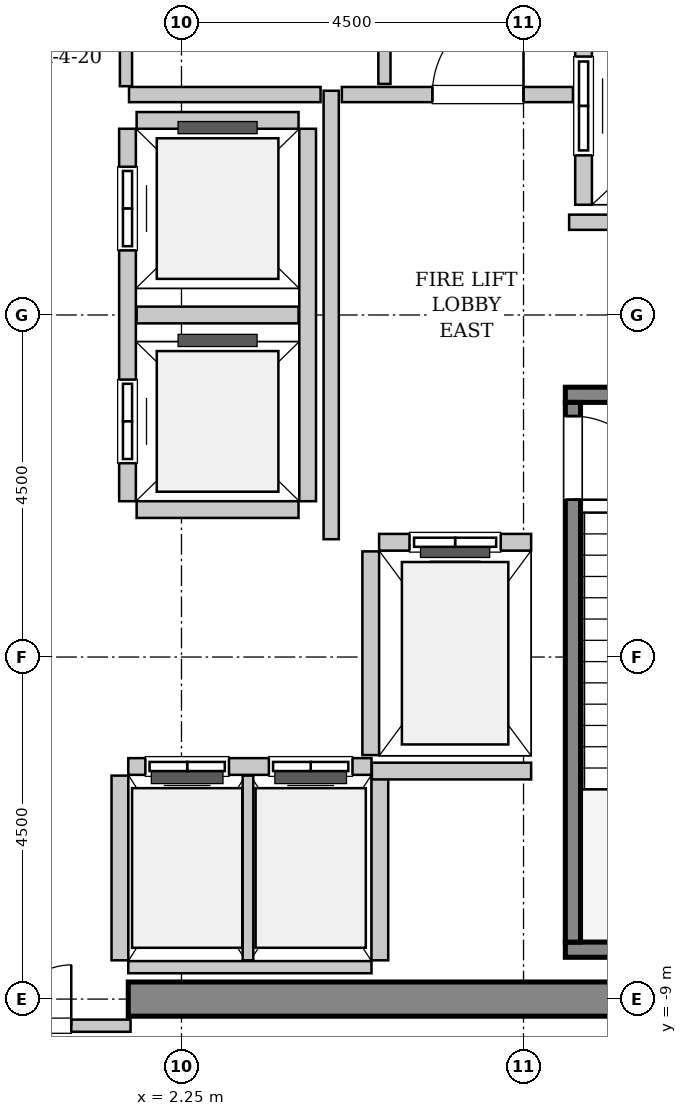
"""IFC4 building model, lengths in metres.
Left out: names, types, materials, properties, quantities, classifications, styles, units other than length and angle.
Written with IfcOpenShell. Run it as: python <this file> out.ifc"""

import sys

from ifc_helpers import new_model, si_unit, direction, frame, frame_2d, origin, place, context, subcontext, project, spatial, rectangle, extrude, source, transform, mapped, element, fill, save


model = new_model("IFC4")
c1 = context("Model", 3, precision=1e-05, world=origin(), true_north=direction((0.0, 1.0)))
c2 = subcontext(c1, "Body", "Model", "MODEL_VIEW")
j1 = project(units=[si_unit("LENGTHUNIT", "METRE"), si_unit("PLANEANGLEUNIT", "RADIAN")], contexts=[c1])
p1 = place(None, origin())
s1 = spatial("IfcSite", under=j1, at=p1, CompositionType="ELEMENT")
p2 = place(p1, origin())
s2 = spatial("IfcBuilding", under=s1, at=p2, CompositionType="ELEMENT")
p3 = place(p2, frame((0.0, 0.0, 259.8)))
s3 = spatial("IfcBuildingStorey", under=s2, at=p3, CompositionType="ELEMENT", Elevation=259.8)
m1 = source(origin(), c2, "Body", "SweptSolid", [
    extrude(rectangle(XDim=9.925, YDim=0.45, at=frame_2d((4.962, 0.0))), origin(), (0.0, 0.0, 1.0), 4.8),
])
p4 = place(p3, frame((1.55, -9.0, 0.0), z_axis=(0.0, 0.0, 1.0), x_axis=(1.0, 0.0, 0.0)))
e1 = element("IfcWall", 1, at=p4, inside=s3, PredefinedType="SHEAR", context=c2, shape_type="MappedRepresentation", body=[
    mapped(m1, transform((0.0, 0.0, 0.0), x_axis=(1.0, 0.0, 0.0), y_axis=(0.0, 1.0, 0.0), z_axis=(0.0, 0.0, 1.0), scale=1.0)),
])
m2 = source(origin(), c2, "Body", "SweptSolid", [
    extrude(rectangle(XDim=3.4, YDim=0.2, at=frame_2d((1.7, 0.0))), origin(), (0.0, 0.0, 1.0), 4.8),
])
p5 = place(p3, frame((7.3, -1.05, 0.0), z_axis=(0.0, 0.0, 1.0), x_axis=(1.0, 0.0, 0.0)))
e2 = element("IfcWall", 2, at=p5, inside=s3, PredefinedType="SOLIDWALL", context=c2, shape_type="MappedRepresentation", body=[
    mapped(m2, transform((0.0, 0.0, 0.0), x_axis=(1.0, 0.0, 0.0), y_axis=(0.0, 1.0, 0.0), z_axis=(0.0, 0.0, 1.0), scale=1.0)),
])
m3 = source(origin(), c2, "Body", "SweptSolid", [
    extrude(rectangle(XDim=3.73, YDim=0.2, at=frame_2d((1.865, 0.0))), origin(), (0.0, 0.0, 1.0), 4.8),
])
p6 = place(p3, frame((7.3, -8.35, 0.0), z_axis=(0.0, 0.0, 1.0), x_axis=(1.0, 0.0, 0.0)))
e3 = element("IfcWall", 3, at=p6, inside=s3, PredefinedType="SOLIDWALL", context=c2, shape_type="MappedRepresentation", body=[
    mapped(m3, transform((0.0, 0.0, 0.0), x_axis=(1.0, 0.0, 0.0), y_axis=(0.0, 1.0, 0.0), z_axis=(0.0, 0.0, 1.0), scale=1.0)),
])
m4 = source(origin(), c2, "Body", "SweptSolid", [
    extrude(rectangle(XDim=7.1, YDim=0.2, at=frame_2d((3.55, 0.0))), origin(), (0.0, 0.0, 1.0), 4.8),
])
p7 = place(p3, frame((7.4, -1.15, 0.0), z_axis=(0.0, 0.0, 1.0), x_axis=(0.0, -1.0, 0.0)))
e4 = element("IfcWall", 4, at=p7, inside=s3, PredefinedType="SOLIDWALL", context=c2, shape_type="MappedRepresentation", body=[
    mapped(m4, transform((0.0, 0.0, 0.0), x_axis=(1.0, 0.0, 0.0), y_axis=(0.0, 1.0, 0.0), z_axis=(0.0, 0.0, 1.0), scale=1.0)),
])
p8 = place(p7, frame((0.18, 0.0, 0.0)))
e5 = element("IfcOpeningElement", 5, at=p8, cuts=e4, PredefinedType="OPENING", context=c2, shape_type="SweptSolid", body=[
    extrude(rectangle(XDim=1.1, YDim=2.15, at=frame_2d((0.55, 1.075))), frame((0.0, 0.11, 0.0), z_axis=(0.0, -1.0, 0.0), x_axis=(1.0, 0.0, 0.0)), (0.0, 0.0, 1.0), 0.22),
])
m5 = source(origin(), c2, "Body", "SweptSolid", [
    extrude(rectangle(XDim=2.0, YDim=0.22, at=frame_2d((1.0, 0.0))), origin(), (0.0, 0.0, 1.0), 4.535),
])
p9 = place(p3, frame((6.85, -2.99, 0.0), z_axis=(0.0, 0.0, 1.0), x_axis=(-1.0, 0.0, 0.0)))
e6 = element("IfcWall", 6, at=p9, inside=s3, PredefinedType="SOLIDWALL", context=c2, shape_type="MappedRepresentation", body=[
    mapped(m5, transform((0.0, 0.0, 0.0), x_axis=(1.0, 0.0, 0.0), y_axis=(0.0, 1.0, 0.0), z_axis=(0.0, 0.0, 1.0), scale=1.0)),
])
p10 = place(p9, frame((0.4, 0.0, 0.0)))
e7 = element("IfcOpeningElement", 7, at=p10, cuts=e6, PredefinedType="OPENING", context=c2, shape_type="SweptSolid", body=[
    extrude(rectangle(XDim=1.2, YDim=2.2, at=frame_2d((0.6, 1.1))), frame((0.0, 0.12, 0.0), z_axis=(0.0, -1.0, 0.0), x_axis=(1.0, 0.0, 0.0)), (0.0, 0.0, 1.0), 0.24),
])
m6 = source(origin(), c2, "Body", "SweptSolid", [
    extrude(rectangle(XDim=2.68, YDim=0.22, at=frame_2d((1.34, 0.0))), origin(), (0.0, 0.0, 1.0), 4.535),
])
p11 = place(p3, frame((4.74, -3.11, 0.0), z_axis=(0.0, 0.0, 1.0), x_axis=(0.0, -1.0, 0.0)))
e8 = element("IfcWall", 8, at=p11, inside=s3, PredefinedType="SOLIDWALL", context=c2, shape_type="MappedRepresentation", body=[
    mapped(m6, transform((0.0, 0.0, 0.0), x_axis=(1.0, 0.0, 0.0), y_axis=(0.0, 1.0, 0.0), z_axis=(0.0, 0.0, 1.0), scale=1.0)),
])
m7 = source(origin(), c2, "Body", "SweptSolid", [
    extrude(rectangle(XDim=5.45, YDim=0.22, at=frame_2d((2.725, 0.0))), origin(), (0.0, 0.0, 1.0), 4.535),
])
p12 = place(p3, frame((7.54, 6.9, 0.0), z_axis=(0.0, 0.0, 1.0), x_axis=(0.0, -1.0, 0.0)))
e9 = element("IfcWall", 9, at=p12, inside=s3, PredefinedType="SOLIDWALL", context=c2, shape_type="MappedRepresentation", body=[
    mapped(m7, transform((0.0, 0.0, 0.0), x_axis=(1.0, 0.0, 0.0), y_axis=(0.0, 1.0, 0.0), z_axis=(0.0, 0.0, 1.0), scale=1.0)),
])
p13 = place(p12, frame((3.5, 0.0, 0.0)))
e10 = element("IfcOpeningElement", 10, at=p13, cuts=e9, PredefinedType="OPENING", context=c2, shape_type="SweptSolid", body=[
    extrude(rectangle(XDim=1.3, YDim=2.3, at=frame_2d((0.65, 1.15))), frame((0.0, 0.12, 0.0), z_axis=(0.0, -1.0, 0.0), x_axis=(1.0, 0.0, 0.0)), (0.0, 0.0, 1.0), 0.24),
])
p14 = place(p12, frame((0.65, 0.0, 0.0)))
e11 = element("IfcOpeningElement", 11, at=p14, cuts=e9, PredefinedType="OPENING", context=c2, shape_type="SweptSolid", body=[
    extrude(rectangle(XDim=1.3, YDim=2.3, at=frame_2d((0.65, 1.15))), frame((0.0, 0.12, 0.0), z_axis=(0.0, -1.0, 0.0), x_axis=(1.0, 0.0, 0.0)), (0.0, 0.0, 1.0), 0.24),
])
m8 = source(origin(), c2, "Body", "SweptSolid", [
    extrude(rectangle(XDim=3.2, YDim=0.22, at=frame_2d((1.6, 0.0))), origin(), (0.0, 0.0, 1.0), 4.535),
])
p15 = place(p3, frame((4.75, -5.94, 0.0), z_axis=(0.0, 0.0, 1.0), x_axis=(-1.0, 0.0, 0.0)))
e12 = element("IfcWall", 12, at=p15, inside=s3, PredefinedType="SOLIDWALL", context=c2, shape_type="MappedRepresentation", body=[
    mapped(m8, transform((0.0, 0.0, 0.0), x_axis=(1.0, 0.0, 0.0), y_axis=(0.0, 1.0, 0.0), z_axis=(0.0, 0.0, 1.0), scale=1.0)),
])
p16 = place(p15, frame((1.875, 0.0, 0.0)))
e13 = element("IfcOpeningElement", 13, at=p16, cuts=e12, PredefinedType="OPENING", context=c2, shape_type="SweptSolid", body=[
    extrude(rectangle(XDim=1.1, YDim=2.2, at=frame_2d((0.55, 1.1))), frame((0.0, 0.12, 0.0), z_axis=(0.0, -1.0, 0.0), x_axis=(1.0, 0.0, 0.0)), (0.0, 0.0, 1.0), 0.24),
])
p17 = place(p15, frame((0.25, 0.0, 0.0)))
e14 = element("IfcOpeningElement", 14, at=p17, cuts=e12, PredefinedType="OPENING", context=c2, shape_type="SweptSolid", body=[
    extrude(rectangle(XDim=1.1, YDim=2.2, at=frame_2d((0.55, 1.1))), frame((0.0, 0.12, 0.0), z_axis=(0.0, -1.0, 0.0), x_axis=(1.0, 0.0, 0.0)), (0.0, 0.0, 1.0), 0.24),
])
m9 = source(origin(), c2, "Body", "SweptSolid", [
    extrude(rectangle(XDim=3.2, YDim=0.16, at=frame_2d((1.6, 0.0))), origin(), (0.0, 0.0, 1.0), 3.625),
])
p18 = place(p3, frame((1.55, -8.58, 0.0), z_axis=(0.0, 0.0, 1.0), x_axis=(1.0, 0.0, 0.0)))
e15 = element("IfcWall", 15, at=p18, inside=s3, PredefinedType="PARTITIONING", context=c2, shape_type="MappedRepresentation", body=[
    mapped(m9, transform((0.0, 0.0, 0.0), x_axis=(1.0, 0.0, 0.0), y_axis=(0.0, 1.0, 0.0), z_axis=(0.0, 0.0, 1.0), scale=1.0)),
])
m10 = source(origin(), c2, "Body", "SweptSolid", [
    extrude(rectangle(XDim=2.43, YDim=0.22, at=frame_2d((1.215, 0.0))), origin(), (0.0, 0.0, 1.0), 4.535),
])
p19 = place(p3, frame((1.44, -6.06, 0.0), z_axis=(0.0, 0.0, 1.0), x_axis=(0.0, -1.0, 0.0)))
e16 = element("IfcWall", 16, at=p19, inside=s3, PredefinedType="SOLIDWALL", context=c2, shape_type="MappedRepresentation", body=[
    mapped(m10, transform((0.0, 0.0, 0.0), x_axis=(1.0, 0.0, 0.0), y_axis=(0.0, 1.0, 0.0), z_axis=(0.0, 0.0, 1.0), scale=1.0)),
])
m11 = source(origin(), c2, "Body", "SweptSolid", [
    extrude(rectangle(XDim=2.43, YDim=0.14, at=frame_2d((1.215, 0.0))), origin(), (0.0, 0.0, 1.0), 4.535),
])
p20 = place(p3, frame((3.125, -8.49, 0.0), z_axis=(0.0, 0.0, 1.0), x_axis=(0.0, 1.0, 0.0)))
e17 = element("IfcWall", 17, at=p20, inside=s3, PredefinedType="PARTITIONING", context=c2, shape_type="MappedRepresentation", body=[
    mapped(m11, transform((0.0, 0.0, 0.0), x_axis=(1.0, 0.0, 0.0), y_axis=(0.0, 1.0, 0.0), z_axis=(0.0, 0.0, 1.0), scale=1.0)),
])
p21 = place(p3, frame((4.86, -8.49, 0.0), z_axis=(0.0, 0.0, 1.0), x_axis=(0.0, 1.0, 0.0)))
e18 = element("IfcWall", 18, at=p21, inside=s3, PredefinedType="SOLIDWALL", context=c2, shape_type="MappedRepresentation", body=[
    mapped(m10, transform((0.0, 0.0, 0.0), x_axis=(1.0, 0.0, 0.0), y_axis=(0.0, 1.0, 0.0), z_axis=(0.0, 0.0, 1.0), scale=1.0)),
])
m12 = source(origin(), c2, "Body", "SweptSolid", [
    extrude(rectangle(XDim=4.9, YDim=0.22, at=frame_2d((2.45, 0.0))), origin(), (0.0, 0.0, 1.0), 4.535),
])
p22 = place(p3, frame((1.54, 2.45, 0.0), z_axis=(0.0, 0.0, 1.0), x_axis=(0.0, -1.0, 0.0)))
e19 = element("IfcWall", 19, at=p22, inside=s3, PredefinedType="SOLIDWALL", context=c2, shape_type="MappedRepresentation", body=[
    mapped(m12, transform((0.0, 0.0, 0.0), x_axis=(1.0, 0.0, 0.0), y_axis=(0.0, 1.0, 0.0), z_axis=(0.0, 0.0, 1.0), scale=1.0)),
])
p23 = place(p22, frame((3.3, 0.0, 0.0)))
e20 = element("IfcOpeningElement", 20, at=p23, cuts=e19, PredefinedType="OPENING", context=c2, shape_type="SweptSolid", body=[
    extrude(rectangle(XDim=1.1, YDim=2.2, at=frame_2d((0.55, 1.1))), frame((0.0, 0.12, 0.0), z_axis=(0.0, -1.0, 0.0), x_axis=(1.0, 0.0, 0.0)), (0.0, 0.0, 1.0), 0.24),
])
p24 = place(p22, frame((0.5, 0.0, 0.0)))
e21 = element("IfcOpeningElement", 21, at=p24, cuts=e19, PredefinedType="OPENING", context=c2, shape_type="SweptSolid", body=[
    extrude(rectangle(XDim=1.1, YDim=2.2, at=frame_2d((0.55, 1.1))), frame((0.0, 0.12, 0.0), z_axis=(0.0, -1.0, 0.0), x_axis=(1.0, 0.0, 0.0)), (0.0, 0.0, 1.0), 0.24),
])
p25 = place(p3, frame((3.91, -2.45, 0.0), z_axis=(0.0, 0.0, 1.0), x_axis=(0.0, 1.0, 0.0)))
e22 = element("IfcWall", 22, at=p25, inside=s3, PredefinedType="SOLIDWALL", context=c2, shape_type="MappedRepresentation", body=[
    mapped(m12, transform((0.0, 0.0, 0.0), x_axis=(1.0, 0.0, 0.0), y_axis=(0.0, 1.0, 0.0), z_axis=(0.0, 0.0, 1.0), scale=1.0)),
])
m13 = source(origin(), c2, "Body", "SweptSolid", [
    extrude(rectangle(XDim=2.13, YDim=0.22, at=frame_2d((1.065, 0.0))), origin(), (0.0, 0.0, 1.0), 4.535),
])
for number, where, z_axis, x_axis in (
    (23, (1.66, -2.56, 0.0), (0.0, 0.0, 1.0), (1.0, 0.0, 0.0)),
    (24, (1.66, 0.0, 0.0), (0.0, 0.0, 1.0), (1.0, 0.0, 0.0)),
    (25, (3.79, 2.56, 0.0), (0.0, 0.0, 1.0), (-1.0, 0.0, 0.0)),
):
    element("IfcWall", number, at=place(p3, frame(where, z_axis=z_axis, x_axis=x_axis)), inside=s3, PredefinedType="SOLIDWALL", context=c2, shape_type="MappedRepresentation", body=[
        mapped(m13, transform((0.0, 0.0, 0.0), x_axis=(1.0, 0.0, 0.0), y_axis=(0.0, 1.0, 0.0), z_axis=(0.0, 0.0, 1.0), scale=1.0)),
    ])
m14 = source(origin(), c2, "Body", "SweptSolid", [
    extrude(rectangle(XDim=2.095, YDim=0.22, at=frame_2d((1.048, 0.0))), origin(), (0.0, 0.0, 1.0), 4.535),
])
p26 = place(p3, frame((4.755, -6.0, 0.0), z_axis=(0.0, 0.0, 1.0), x_axis=(1.0, 0.0, 0.0)))
e26 = element("IfcWall", 26, at=p26, inside=s3, PredefinedType="SOLIDWALL", context=c2, shape_type="MappedRepresentation", body=[
    mapped(m14, transform((0.0, 0.0, 0.0), x_axis=(1.0, 0.0, 0.0), y_axis=(0.0, 1.0, 0.0), z_axis=(0.0, 0.0, 1.0), scale=1.0)),
])
m15 = source(origin(), c2, "Body", "SweptSolid", [
    extrude(rectangle(XDim=5.9, YDim=0.2, at=frame_2d((2.95, 0.0))), origin(), (0.0, 0.0, 1.0), 4.535),
])
p27 = place(p3, frame((4.22, -2.95, 0.0), z_axis=(0.0, 0.0, 1.0), x_axis=(0.0, 1.0, 0.0)))
e27 = element("IfcWall", 27, at=p27, inside=s3, PredefinedType="PARTITIONING", context=c2, shape_type="MappedRepresentation", body=[
    mapped(m15, transform((0.0, 0.0, 0.0), x_axis=(1.0, 0.0, 0.0), y_axis=(0.0, 1.0, 0.0), z_axis=(0.0, 0.0, 1.0), scale=1.0)),
])
m16 = source(origin(), c2, "Body", "SweptSolid", [
    extrude(rectangle(XDim=2.52, YDim=0.2, at=frame_2d((1.26, 0.0))), origin(), (0.0, 0.0, 1.0), 4.535),
])
p28 = place(p3, frame((1.56, 2.9, 0.0), z_axis=(0.0, 0.0, 1.0), x_axis=(1.0, 0.0, 0.0)))
e28 = element("IfcWall", 28, at=p28, inside=s3, PredefinedType="PARTITIONING", context=c2, shape_type="MappedRepresentation", body=[
    mapped(m16, transform((0.0, 0.0, 0.0), x_axis=(1.0, 0.0, 0.0), y_axis=(0.0, 1.0, 0.0), z_axis=(0.0, 0.0, 1.0), scale=1.0)),
])
m17 = source(origin(), c2, "Body", "SweptSolid", [
    extrude(rectangle(XDim=3.04, YDim=0.2, at=frame_2d((1.52, 0.0))), origin(), (0.0, 0.0, 1.0), 4.535),
])
p29 = place(p3, frame((4.36, 2.9, 0.0), z_axis=(0.0, 0.0, 1.0), x_axis=(1.0, 0.0, 0.0)))
e29 = element("IfcWall", 29, at=p29, inside=s3, PredefinedType="PARTITIONING", context=c2, shape_type="MappedRepresentation", body=[
    mapped(m17, transform((0.0, 0.0, 0.0), x_axis=(1.0, 0.0, 0.0), y_axis=(0.0, 1.0, 0.0), z_axis=(0.0, 0.0, 1.0), scale=1.0)),
])
p30 = place(p29, frame((1.19, 0.0, 0.0)))
e30 = element("IfcOpeningElement", 30, at=p30, cuts=e29, PredefinedType="OPENING", context=c2, shape_type="SweptSolid", body=[
    extrude(rectangle(XDim=1.2, YDim=2.15, at=frame_2d((0.6, 1.075))), frame((0.0, 0.11, 0.0), z_axis=(0.0, -1.0, 0.0), x_axis=(1.0, 0.0, 0.0)), (0.0, 0.0, 1.0), 0.22),
])
m18 = source(origin(), c2, "Body", "SweptSolid", [
    extrude(rectangle(XDim=4.11, YDim=0.2, at=frame_2d((2.055, 0.0))), origin(), (0.0, 0.0, 1.0), 4.535),
])
p31 = place(p3, frame((7.35, 1.22, 0.0), z_axis=(0.0, 0.0, 1.0), x_axis=(1.0, 0.0, 0.0)))
e31 = element("IfcWall", 31, at=p31, inside=s3, PredefinedType="PARTITIONING", context=c2, shape_type="MappedRepresentation", body=[
    mapped(m18, transform((0.0, 0.0, 0.0), x_axis=(1.0, 0.0, 0.0), y_axis=(0.0, 1.0, 0.0), z_axis=(0.0, 0.0, 1.0), scale=1.0)),
])
m19 = source(origin(), c2, "Body", "SweptSolid", [
    extrude(rectangle(XDim=3.16, YDim=0.16, at=frame_2d((1.58, 0.0))), origin(), (0.0, 0.0, 1.0), 3.625),
])
p32 = place(p3, frame((-1.58, -9.35, 0.0), z_axis=(0.0, 0.0, 1.0), x_axis=(1.0, 0.0, 0.0)))
e32 = element("IfcWall", 32, at=p32, inside=s3, PredefinedType="PARTITIONING", context=c2, shape_type="MappedRepresentation", body=[
    mapped(m19, transform((0.0, 0.0, 0.0), x_axis=(1.0, 0.0, 0.0), y_axis=(0.0, 1.0, 0.0), z_axis=(0.0, 0.0, 1.0), scale=1.0)),
])
p33 = place(p32, frame((0.78, 0.0, 0.0)))
e33 = element("IfcOpeningElement", 33, at=p33, cuts=e32, PredefinedType="OPENING", context=c2, shape_type="SweptSolid", body=[
    extrude(rectangle(XDim=1.6, YDim=2.3, at=frame_2d((0.8, 1.15))), frame((0.0, 0.09, 0.0), z_axis=(0.0, -1.0, 0.0), x_axis=(1.0, 0.0, 0.0)), (0.0, 0.0, 1.0), 0.18),
])
m20 = source(origin(), c2, "Body", "SweptSolid", [
    extrude(rectangle(XDim=5.45, YDim=0.16, at=frame_2d((2.725, 0.0))), origin(), (0.0, 0.0, 1.0), 4.535),
])
p34 = place(p3, frame((4.92, 3.04, 0.0), z_axis=(0.0, 0.0, 1.0), x_axis=(0.0, 1.0, 0.0)))
e34 = element("IfcWall", 34, at=p34, inside=s3, PredefinedType="PARTITIONING", context=c2, shape_type="MappedRepresentation", body=[
    mapped(m20, transform((0.0, 0.0, 0.0), x_axis=(1.0, 0.0, 0.0), y_axis=(0.0, 1.0, 0.0), z_axis=(0.0, 0.0, 1.0), scale=1.0)),
])
m21 = source(origin(), c2, "Body", "SweptSolid", [
    extrude(rectangle(XDim=5.48, YDim=0.16, at=frame_2d((2.74, 0.0))), origin(), (0.0, 0.0, 1.0), 4.535),
])
p35 = place(p3, frame((1.52, 3.01, 0.0), z_axis=(0.0, 0.0, 1.0), x_axis=(0.0, 1.0, 0.0)))
e35 = element("IfcWall", 35, at=p35, inside=s3, PredefinedType="PARTITIONING", context=c2, shape_type="MappedRepresentation", body=[
    mapped(m21, transform((0.0, 0.0, 0.0), x_axis=(1.0, 0.0, 0.0), y_axis=(0.0, 1.0, 0.0), z_axis=(0.0, 0.0, 1.0), scale=1.0)),
])
p36 = place(p35, frame((2.315, 0.0, 0.0)))
e36 = element("IfcOpeningElement", 36, at=p36, cuts=e35, PredefinedType="OPENING", context=c2, shape_type="SweptSolid", body=[
    extrude(rectangle(XDim=0.85, YDim=2.1, at=frame_2d((0.425, 1.05))), frame((0.0, 0.09, 0.0), z_axis=(0.0, -1.0, 0.0), x_axis=(1.0, 0.0, 0.0)), (0.0, 0.0, 1.0), 0.18),
])
m22 = source(origin(), c2, "Body", "SweptSolid", [
    extrude(rectangle(XDim=1.1, YDim=2.15, at=frame_2d((0.55, 1.075))), frame((0.0, 0.025, 0.0), z_axis=(0.0, -1.0, 0.0), x_axis=(1.0, 0.0, 0.0)), (0.0, 0.0, 1.0), 0.05),
])
p37 = place(p8, origin())
e37 = element("IfcDoor", 37, at=p37, inside=s3, OperationType="SINGLE_SWING_RIGHT", PredefinedType="DOOR", context=c2, shape_type="MappedRepresentation", body=[
    mapped(m22, transform((0.0, 0.0, 0.0), x_axis=(1.0, 0.0, 0.0), y_axis=(0.0, 1.0, 0.0), z_axis=(0.0, 0.0, 1.0), scale=1.0)),
])
fill(e5, e37)
m23 = source(origin(), c2, "Body", "SweptSolid", [
    extrude(rectangle(XDim=1.2, YDim=2.2, at=frame_2d((0.6, 1.1))), frame((0.0, 0.025, 0.0), z_axis=(0.0, -1.0, 0.0), x_axis=(1.0, 0.0, 0.0)), (0.0, 0.0, 1.0), 0.05),
])
p38 = place(p10, origin())
e38 = element("IfcDoor", 38, at=p38, inside=s3, OperationType="SLIDING_TO_LEFT", PredefinedType="DOOR", context=c2, shape_type="MappedRepresentation", body=[
    mapped(m23, transform((0.0, 0.0, 0.0), x_axis=(1.0, 0.0, 0.0), y_axis=(0.0, 1.0, 0.0), z_axis=(0.0, 0.0, 1.0), scale=1.0)),
])
fill(e7, e38)
m24 = source(origin(), c2, "Body", "SweptSolid", [
    extrude(rectangle(XDim=1.3, YDim=2.3, at=frame_2d((0.65, 1.15))), frame((0.0, 0.025, 0.0), z_axis=(0.0, -1.0, 0.0), x_axis=(1.0, 0.0, 0.0)), (0.0, 0.0, 1.0), 0.05),
])
p39 = place(p13, origin())
e39 = element("IfcDoor", 39, at=p39, inside=s3, OperationType="SLIDING_TO_RIGHT", PredefinedType="DOOR", context=c2, shape_type="MappedRepresentation", body=[
    mapped(m24, transform((0.0, 0.0, 0.0), x_axis=(1.0, 0.0, 0.0), y_axis=(0.0, 1.0, 0.0), z_axis=(0.0, 0.0, 1.0), scale=1.0)),
])
fill(e10, e39)
m25 = source(origin(), c2, "Body", "SweptSolid", [
    extrude(rectangle(XDim=1.1, YDim=2.2, at=frame_2d((0.55, 1.1))), frame((0.0, 0.025, 0.0), z_axis=(0.0, -1.0, 0.0), x_axis=(1.0, 0.0, 0.0)), (0.0, 0.0, 1.0), 0.05),
])
p40 = place(p16, origin())
e40 = element("IfcDoor", 40, at=p40, inside=s3, OperationType="DOUBLE_DOOR_SLIDING", PredefinedType="DOOR", context=c2, shape_type="MappedRepresentation", body=[
    mapped(m25, transform((0.0, 0.0, 0.0), x_axis=(1.0, 0.0, 0.0), y_axis=(0.0, 1.0, 0.0), z_axis=(0.0, 0.0, 1.0), scale=1.0)),
])
fill(e13, e40)
p41 = place(p17, origin())
e41 = element("IfcDoor", 41, at=p41, inside=s3, OperationType="DOUBLE_DOOR_SLIDING", PredefinedType="DOOR", context=c2, shape_type="MappedRepresentation", body=[
    mapped(m25, transform((0.0, 0.0, 0.0), x_axis=(1.0, 0.0, 0.0), y_axis=(0.0, 1.0, 0.0), z_axis=(0.0, 0.0, 1.0), scale=1.0)),
])
fill(e14, e41)
p42 = place(p23, origin())
e42 = element("IfcDoor", 42, at=p42, inside=s3, OperationType="DOUBLE_DOOR_SLIDING", PredefinedType="DOOR", context=c2, shape_type="MappedRepresentation", body=[
    mapped(m25, transform((0.0, 0.0, 0.0), x_axis=(1.0, 0.0, 0.0), y_axis=(0.0, 1.0, 0.0), z_axis=(0.0, 0.0, 1.0), scale=1.0)),
])
fill(e20, e42)
p43 = place(p24, origin())
e43 = element("IfcDoor", 43, at=p43, inside=s3, OperationType="DOUBLE_DOOR_SLIDING", PredefinedType="DOOR", context=c2, shape_type="MappedRepresentation", body=[
    mapped(m25, transform((0.0, 0.0, 0.0), x_axis=(1.0, 0.0, 0.0), y_axis=(0.0, 1.0, 0.0), z_axis=(0.0, 0.0, 1.0), scale=1.0)),
])
fill(e21, e43)
m26 = source(origin(), c2, "Body", "SweptSolid", [
    extrude(rectangle(XDim=1.2, YDim=2.15, at=frame_2d((0.6, 1.075))), frame((0.0, 0.025, 0.0), z_axis=(0.0, -1.0, 0.0), x_axis=(1.0, 0.0, 0.0)), (0.0, 0.0, 1.0), 0.05),
])
p44 = place(p30, origin())
e44 = element("IfcDoor", 44, at=p44, inside=s3, OperationType="SINGLE_SWING_RIGHT", PredefinedType="DOOR", context=c2, shape_type="MappedRepresentation", body=[
    mapped(m26, transform((0.0, 0.0, 0.0), x_axis=(1.0, 0.0, 0.0), y_axis=(0.0, 1.0, 0.0), z_axis=(0.0, 0.0, 1.0), scale=1.0)),
])
fill(e30, e44)
m27 = source(origin(), c2, "Body", "SweptSolid", [
    extrude(rectangle(XDim=1.6, YDim=2.3, at=frame_2d((0.8, 1.15))), frame((0.0, 0.025, 0.0), z_axis=(0.0, -1.0, 0.0), x_axis=(1.0, 0.0, 0.0)), (0.0, 0.0, 1.0), 0.05),
])
p45 = place(p33, origin())
e45 = element("IfcDoor", 45, at=p45, inside=s3, OperationType="DOUBLE_DOOR_SINGLE_SWING", PredefinedType="DOOR", context=c2, shape_type="MappedRepresentation", body=[
    mapped(m27, transform((0.0, 0.0, 0.0), x_axis=(1.0, 0.0, 0.0), y_axis=(0.0, 1.0, 0.0), z_axis=(0.0, 0.0, 1.0), scale=1.0)),
])
fill(e33, e45)
save(model, sys.argv[1])
